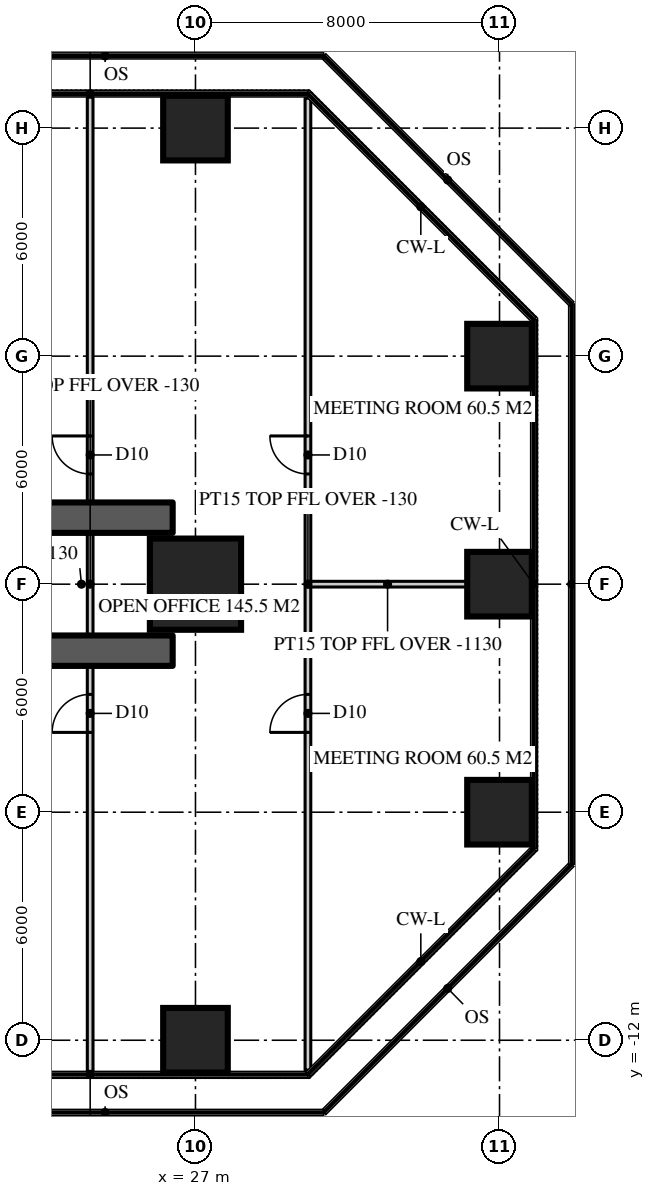
"""IFC4 building model, lengths in metres.
Left out: names, types, materials, properties, quantities, classifications, styles, units other than length and angle.
Written with IfcOpenShell. Run it as: python <this file> out.ifc"""

import sys

from ifc_helpers import new_model, si_unit, direction, frame, frame_2d, origin, origin_2d, place, context, subcontext, project, spatial, rectangle, extrude, element, fill, save


model = new_model("IFC4")
c1 = context("Model", 3, precision=1e-05, world=origin(), true_north=direction((0.0, 1.0)))
c2 = subcontext(c1, "Body", "Model", "MODEL_VIEW")
j1 = project(units=[si_unit("LENGTHUNIT", "METRE"), si_unit("PLANEANGLEUNIT", "RADIAN")], contexts=[c1])
p1 = place(None, origin())
s1 = spatial("IfcSite", under=j1, at=p1, CompositionType="ELEMENT")
p2 = place(p1, origin())
s2 = spatial("IfcBuilding", under=s1, at=p2, CompositionType="ELEMENT")
p3 = place(p2, frame((0.0, 0.0, 70.8)))
s3 = spatial("IfcBuildingStorey", under=s2, at=p3, CompositionType="ELEMENT", Elevation=70.8)
for number, where, z_axis, x_axis in (
    (1, (11.15, -1.75, 0.0), (0.0, 0.0, 1.0), (1.0, 0.0, 0.0)),
    (2, (11.15, 1.75, 0.0), (0.0, 0.0, 1.0), (1.0, 0.0, 0.0)),
):
    element("IfcWall", number, at=place(p3, frame(where, z_axis=z_axis, x_axis=x_axis)), inside=s3, PredefinedType="SHEAR", context=c2, shape_type="SweptSolid", body=[
        extrude(rectangle(XDim=15.25, YDim=0.8, at=frame_2d((7.625, 0.0))), origin(), (0.0, 0.0, 1.0), 3.9),
    ])
for number, where, z_axis, x_axis in (
    (3, (27.0, -12.0, 0.0), (0.0, 0.0, 1.0), (1.0, 0.0, 0.0)),
    (4, (35.0, -6.0, 0.0), (0.0, 0.0, 1.0), (1.0, 0.0, 0.0)),
):
    element("IfcColumn", number, at=place(p3, frame(where, z_axis=z_axis, x_axis=x_axis)), inside=s3, PredefinedType="COLUMN", context=c2, shape_type="SweptSolid", body=[
        extrude(rectangle(XDim=1.7, YDim=1.7, at=origin_2d()), origin(), (0.0, 0.0, 1.0), 3.9),
    ])
p4 = place(p3, frame((27.0, 0.0, 0.0), z_axis=(0.0, 0.0, 1.0), x_axis=(1.0, 0.0, 0.0)))
e5 = element("IfcColumn", 5, at=p4, inside=s3, PredefinedType="COLUMN", context=c2, shape_type="SweptSolid", body=[
    extrude(rectangle(XDim=2.4, YDim=2.4, at=origin_2d()), origin(), (0.0, 0.0, 1.0), 3.9),
])
for number, where, z_axis, x_axis in (
    (6, (35.0, 0.0, 0.0), (0.0, 0.0, 1.0), (1.0, 0.0, 0.0)),
    (7, (35.0, 6.0, 0.0), (0.0, 0.0, 1.0), (1.0, 0.0, 0.0)),
    (8, (27.0, 12.0, 0.0), (0.0, 0.0, 1.0), (1.0, 0.0, 0.0)),
):
    element("IfcColumn", number, at=place(p3, frame(where, z_axis=z_axis, x_axis=x_axis)), inside=s3, PredefinedType="COLUMN", context=c2, shape_type="SweptSolid", body=[
        extrude(rectangle(XDim=1.7, YDim=1.7, at=origin_2d()), origin(), (0.0, 0.0, 1.0), 3.9),
    ])
p5 = place(p3, frame((24.229, -12.82, 0.0), z_axis=(0.0, 0.0, 1.0), x_axis=(0.0, 1.0, 0.0)))
e9 = element("IfcWall", 9, at=p5, inside=s3, PredefinedType="PARTITIONING", context=c2, shape_type="SweptSolid", body=[
    extrude(rectangle(XDim=25.64, YDim=0.15, at=frame_2d((12.82, 0.0))), origin(), (0.0, 0.0, 1.0), 3.77),
])
p6 = place(p5, frame((15.72, 0.0, 0.0)))
e10 = element("IfcOpeningElement", 10, at=p6, cuts=e9, PredefinedType="OPENING", context=c2, shape_type="SweptSolid", body=[
    extrude(rectangle(XDim=1.0, YDim=2.2, at=frame_2d((0.5, 1.1))), frame((0.0, 0.085, 0.0), z_axis=(0.0, -1.0, 0.0), x_axis=(1.0, 0.0, 0.0)), (0.0, 0.0, 1.0), 0.17),
])
p7 = place(p5, frame((8.92, 0.0, 0.0)))
e11 = element("IfcOpeningElement", 11, at=p7, cuts=e9, PredefinedType="OPENING", context=c2, shape_type="SweptSolid", body=[
    extrude(rectangle(XDim=1.0, YDim=2.2, at=frame_2d((0.5, 1.1))), frame((0.0, 0.085, 0.0), z_axis=(0.0, -1.0, 0.0), x_axis=(1.0, 0.0, 0.0)), (0.0, 0.0, 1.0), 0.17),
])
p8 = place(p3, frame((29.959, -12.786, 0.0), z_axis=(0.0, 0.0, 1.0), x_axis=(0.0, 1.0, 0.0)))
e12 = element("IfcWall", 12, at=p8, inside=s3, PredefinedType="PARTITIONING", context=c2, shape_type="SweptSolid", body=[
    extrude(rectangle(XDim=25.573, YDim=0.15, at=frame_2d((12.786, 0.0))), origin(), (0.0, 0.0, 1.0), 3.77),
])
p9 = place(p8, frame((15.687, 0.0, 0.0)))
e13 = element("IfcOpeningElement", 13, at=p9, cuts=e12, PredefinedType="OPENING", context=c2, shape_type="SweptSolid", body=[
    extrude(rectangle(XDim=1.0, YDim=2.2, at=frame_2d((0.5, 1.1))), frame((0.0, 0.085, 0.0), z_axis=(0.0, -1.0, 0.0), x_axis=(1.0, 0.0, 0.0)), (0.0, 0.0, 1.0), 0.17),
])
p10 = place(p8, frame((8.886, 0.0, 0.0)))
e14 = element("IfcOpeningElement", 14, at=p10, cuts=e12, PredefinedType="OPENING", context=c2, shape_type="SweptSolid", body=[
    extrude(rectangle(XDim=1.0, YDim=2.2, at=frame_2d((0.5, 1.1))), frame((0.0, 0.085, 0.0), z_axis=(0.0, -1.0, 0.0), x_axis=(1.0, 0.0, 0.0)), (0.0, 0.0, 1.0), 0.17),
])
p11 = place(p3, frame((29.959, 0.0, 0.0), z_axis=(0.0, 0.0, 1.0), x_axis=(1.0, 0.0, 0.0)))
e15 = element("IfcWall", 15, at=p11, inside=s3, PredefinedType="PARTITIONING", context=c2, shape_type="SweptSolid", body=[
    extrude(rectangle(XDim=4.191, YDim=0.15, at=frame_2d((2.095, 0.0))), origin(), (0.0, 0.0, 1.0), 2.77),
])
p12 = place(p6, origin())
e16 = element("IfcDoor", 16, at=p12, inside=s3, OperationType="SINGLE_SWING_RIGHT", PredefinedType="DOOR", context=c2, shape_type="SweptSolid", body=[
    extrude(rectangle(XDim=1.0, YDim=2.2, at=frame_2d((0.5, 1.1))), frame((0.0, 0.025, 0.0), z_axis=(0.0, -1.0, 0.0), x_axis=(1.0, 0.0, 0.0)), (0.0, 0.0, 1.0), 0.05),
])
fill(e10, e16)
p13 = place(p7, origin())
e17 = element("IfcDoor", 17, at=p13, inside=s3, OperationType="SINGLE_SWING_LEFT", PredefinedType="DOOR", context=c2, shape_type="SweptSolid", body=[
    extrude(rectangle(XDim=1.0, YDim=2.2, at=frame_2d((0.5, 1.1))), frame((0.0, 0.025, 0.0), z_axis=(0.0, -1.0, 0.0), x_axis=(1.0, 0.0, 0.0)), (0.0, 0.0, 1.0), 0.05),
])
fill(e11, e17)
p14 = place(p9, origin())
e18 = element("IfcDoor", 18, at=p14, inside=s3, OperationType="SINGLE_SWING_RIGHT", PredefinedType="DOOR", context=c2, shape_type="SweptSolid", body=[
    extrude(rectangle(XDim=1.0, YDim=2.2, at=frame_2d((0.5, 1.1))), frame((0.0, 0.025, 0.0), z_axis=(0.0, -1.0, 0.0), x_axis=(1.0, 0.0, 0.0)), (0.0, 0.0, 1.0), 0.05),
])
fill(e13, e18)
p15 = place(p10, origin())
e19 = element("IfcDoor", 19, at=p15, inside=s3, OperationType="SINGLE_SWING_LEFT", PredefinedType="DOOR", context=c2, shape_type="SweptSolid", body=[
    extrude(rectangle(XDim=1.0, YDim=2.2, at=frame_2d((0.5, 1.1))), frame((0.0, 0.025, 0.0), z_axis=(0.0, -1.0, 0.0), x_axis=(1.0, 0.0, 0.0)), (0.0, 0.0, 1.0), 0.05),
])
fill(e14, e19)
save(model, sys.argv[1])
